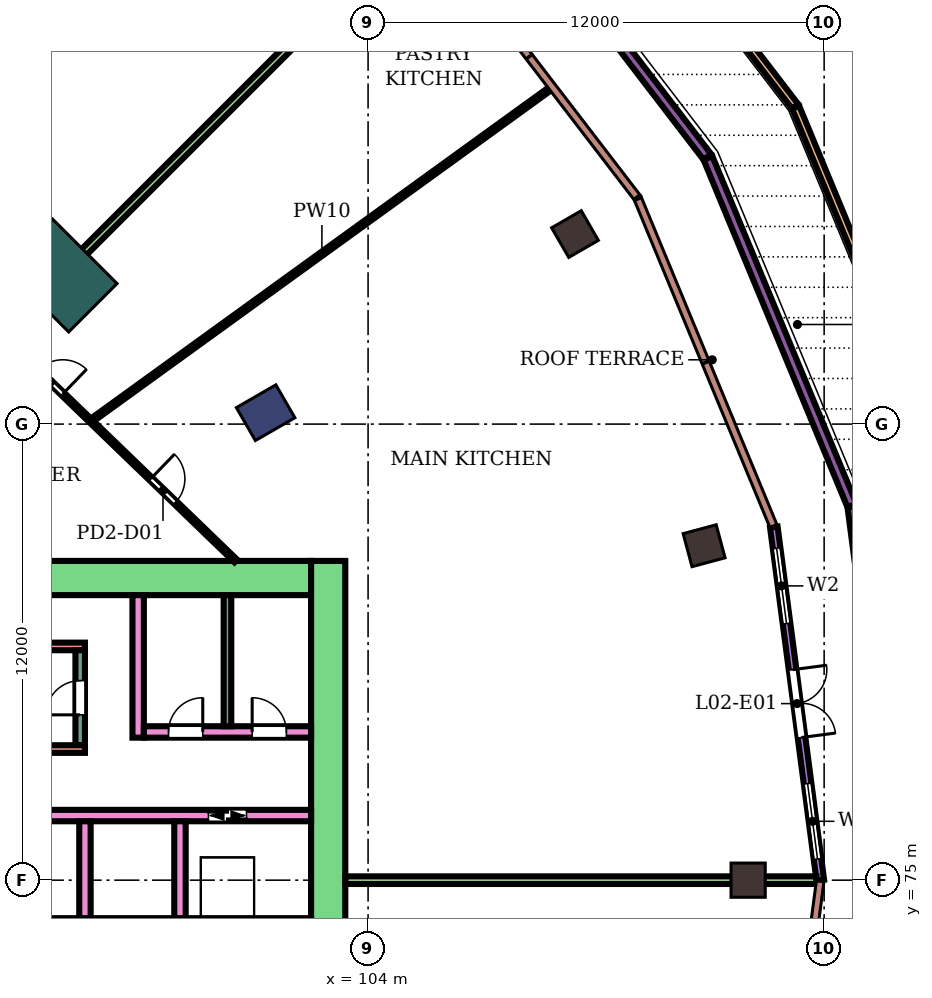
"""IFC4 building model, lengths in metres.
Left out: names, types, materials, properties, quantities, classifications, styles, units other than length and angle.
Written with IfcOpenShell. Run it as: python <this file> out.ifc"""

import sys

from ifc_helpers import new_model, si_unit, direction, frame, frame_2d, origin, origin_2d, place, context, subcontext, project, spatial, rectangle, extrude, element, fill, save


model = new_model("IFC4")
c1 = context("Model", 3, precision=1e-05, world=origin(), true_north=direction((0.0, 1.0)))
c2 = subcontext(c1, "Body", "Model", "MODEL_VIEW")
j1 = project(units=[si_unit("LENGTHUNIT", "METRE"), si_unit("PLANEANGLEUNIT", "RADIAN")], contexts=[c1])
p1 = place(None, origin())
s1 = spatial("IfcSite", under=j1, at=p1, CompositionType="ELEMENT")
p2 = place(p1, origin())
s2 = spatial("IfcBuilding", under=s1, at=p2, CompositionType="ELEMENT")
p3 = place(p2, frame((0.0, 0.0, 12.4)))
s3 = spatial("IfcBuildingStorey", under=s2, at=p3, CompositionType="ELEMENT", Elevation=12.4)
for number, where, z_axis, x_axis in (
    (1, (114.0, 75.0, 0.0), (0.0, 0.0, 1.0), (1.0, 0.0, 0.0)),
    (2, (112.842, 83.8, 0.0), (0.0, 0.0, 1.0), (0.966, 0.259, 0.0)),
    (3, (109.445, 92.0, 0.0), (0.0, 0.0, 1.0), (0.866, 0.5, 0.0)),
):
    element("IfcColumn", number, at=place(p3, frame(where, z_axis=z_axis, x_axis=x_axis)), inside=s3, PredefinedType="COLUMN", context=c2, shape_type="SweptSolid", body=[
        extrude(rectangle(XDim=0.9, YDim=0.9, at=origin_2d()), origin(), (0.0, 0.0, 1.0), 5.4),
    ])
p4 = place(p3, frame((101.304, 87.3, 0.0), z_axis=(0.0, 0.0, 1.0), x_axis=(0.866025403784, 0.5, 0.0)))
e4 = element("IfcColumn", 4, at=p4, inside=s3, PredefinedType="COLUMN", context=c2, shape_type="SweptSolid", body=[
    extrude(rectangle(XDim=1.2, YDim=1.0, at=origin_2d()), origin(), (0.0, 0.0, 1.0), 5.4),
])
p5 = place(p3, frame((95.91, 90.91, 0.0), z_axis=(0.0, 0.0, 1.0), x_axis=(0.707106781187, 0.707106781187, 0.0)))
e5 = element("IfcColumn", 5, at=p5, inside=s3, PredefinedType="COLUMN", context=c2, shape_type="SweptSolid", body=[
    extrude(rectangle(XDim=1.8, YDim=2.4, at=origin_2d()), origin(), (0.0, 0.0, 1.0), 5.4),
])
p6 = place(p3, frame((87.9, 82.95, 0.0), z_axis=(0.0, 0.0, 1.0), x_axis=(1.0, 0.0, 0.0)))
e6 = element("IfcWall", 6, at=p6, inside=s3, PredefinedType="SHEAR", context=c2, shape_type="SweptSolid", body=[
    extrude(rectangle(XDim=14.6, YDim=0.9, at=frame_2d((7.3, 0.0))), origin(), (0.0, 0.0, 1.0), 4.95),
])
p7 = place(p6, frame((4.2, 0.0, 0.0)))
e7 = element("IfcOpeningElement", 7, at=p7, cuts=e6, PredefinedType="OPENING", context=c2, shape_type="SweptSolid", body=[
    extrude(rectangle(XDim=2.4, YDim=2.4, at=frame_2d((1.2, 1.2))), frame((0.0, 0.46, 0.0), z_axis=(0.0, -1.0, 0.0), x_axis=(1.0, 0.0, 0.0)), (0.0, 0.0, 1.0), 0.92),
])
p8 = place(p3, frame((102.95, 66.6, 0.0), z_axis=(0.0, 0.0, 1.0), x_axis=(0.0, 1.0, 0.0)))
e8 = element("IfcWall", 8, at=p8, inside=s3, PredefinedType="SHEAR", context=c2, shape_type="SweptSolid", body=[
    extrude(rectangle(XDim=16.8, YDim=0.9, at=frame_2d((8.4, 0.0))), origin(), (0.0, 0.0, 1.0), 4.95),
])
p9 = place(p3, frame((91.7, 76.7, 0.0), z_axis=(0.0, 0.0, 1.0), x_axis=(1.0, 0.0, 0.0)))
e9 = element("IfcWall", 9, at=p9, inside=s3, PredefinedType="SHEAR", context=c2, shape_type="SweptSolid", body=[
    extrude(rectangle(XDim=10.8, YDim=0.3, at=frame_2d((5.4, 0.0))), origin(), (0.0, 0.0, 1.0), 4.95),
])
p10 = place(p9, frame((0.55, 0.0, 0.0)))
e10 = element("IfcOpeningElement", 10, at=p10, cuts=e9, PredefinedType="OPENING", context=c2, shape_type="SweptSolid", body=[
    extrude(rectangle(XDim=1.1, YDim=2.1, at=frame_2d((0.55, 1.05))), frame((0.0, 0.16, 0.0), z_axis=(0.0, -1.0, 0.0), x_axis=(1.0, 0.0, 0.0)), (0.0, 0.0, 1.0), 0.32),
])
p11 = place(p9, frame((8.1, 0.0, 0.0)))
e11 = element("IfcOpeningElement", 11, at=p11, cuts=e9, PredefinedType="OPENING", context=c2, shape_type="SweptSolid", body=[
    extrude(rectangle(XDim=1.0, YDim=2.1, at=frame_2d((0.5, 1.05))), frame((0.0, 0.16, 0.0), z_axis=(0.0, -1.0, 0.0), x_axis=(1.0, 0.0, 0.0)), (0.0, 0.0, 1.0), 0.32),
])
for number, where, z_axis, x_axis in (
    (12, (96.55, 74.0, 0.0), (0.0, 0.0, 1.0), (0.0, 1.0, 0.0)),
    (13, (99.05, 74.0, 0.0), (0.0, 0.0, 1.0), (0.0, 1.0, 0.0)),
):
    element("IfcWall", number, at=place(p3, frame(where, z_axis=z_axis, x_axis=x_axis)), inside=s3, PredefinedType="SHEAR", context=c2, shape_type="SweptSolid", body=[
        extrude(rectangle(XDim=2.55, YDim=0.3, at=frame_2d((1.275, 0.0))), origin(), (0.0, 0.0, 1.0), 4.95),
    ])
p12 = place(p3, frame((91.7, 81.15, 0.0), z_axis=(0.0, 0.0, 1.0), x_axis=(1.0, 0.0, 0.0)))
e14 = element("IfcWall", 14, at=p12, inside=s3, PredefinedType="SHEAR", context=c2, shape_type="SweptSolid", body=[
    extrude(rectangle(XDim=4.85, YDim=0.2, at=frame_2d((2.425, 0.0))), origin(), (0.0, 0.0, 1.0), 4.95),
])
p13 = place(p3, frame((96.425, 78.55, 0.0), z_axis=(0.0, 0.0, 1.0), x_axis=(0.0, 1.0, 0.0)))
e15 = element("IfcWall", 15, at=p13, inside=s3, PredefinedType="SHEAR", context=c2, shape_type="SweptSolid", body=[
    extrude(rectangle(XDim=2.5, YDim=0.25, at=frame_2d((1.25, 0.0))), origin(), (0.0, 0.0, 1.0), 4.95),
])
p14 = place(p13, frame((0.8, 0.0, 0.0)))
e16 = element("IfcOpeningElement", 16, at=p14, cuts=e15, PredefinedType="OPENING", context=c2, shape_type="SweptSolid", body=[
    extrude(rectangle(XDim=0.9, YDim=2.1, at=frame_2d((0.45, 1.05))), frame((0.0, 0.135, 0.0), z_axis=(0.0, -1.0, 0.0), x_axis=(1.0, 0.0, 0.0)), (0.0, 0.0, 1.0), 0.27),
])
p15 = place(p3, frame((94.3, 78.45, 0.0), z_axis=(0.0, 0.0, 1.0), x_axis=(1.0, 0.0, 0.0)))
e17 = element("IfcWall", 17, at=p15, inside=s3, PredefinedType="SHEAR", context=c2, shape_type="SweptSolid", body=[
    extrude(rectangle(XDim=2.25, YDim=0.2, at=frame_2d((1.125, 0.0))), origin(), (0.0, 0.0, 1.0), 4.95),
])
p16 = place(p3, frame((97.95, 78.75, 0.0), z_axis=(0.0, 0.0, 1.0), x_axis=(0.0, 1.0, 0.0)))
e18 = element("IfcWall", 18, at=p16, inside=s3, PredefinedType="SHEAR", context=c2, shape_type="SweptSolid", body=[
    extrude(rectangle(XDim=3.75, YDim=0.3, at=frame_2d((1.875, 0.0))), origin(), (0.0, 0.0, 1.0), 4.95),
])
p17 = place(p3, frame((98.1, 78.9, 0.0), z_axis=(0.0, 0.0, 1.0), x_axis=(1.0, 0.0, 0.0)))
e19 = element("IfcWall", 19, at=p17, inside=s3, PredefinedType="SHEAR", context=c2, shape_type="SweptSolid", body=[
    extrude(rectangle(XDim=4.4, YDim=0.3, at=frame_2d((2.2, 0.0))), origin(), (0.0, 0.0, 1.0), 4.95),
])
p18 = place(p17, frame((0.65, 0.0, 0.0)))
e20 = element("IfcOpeningElement", 20, at=p18, cuts=e19, PredefinedType="OPENING", context=c2, shape_type="SweptSolid", body=[
    extrude(rectangle(XDim=0.9, YDim=2.1, at=frame_2d((0.45, 1.05))), frame((0.0, 0.16, 0.0), z_axis=(0.0, -1.0, 0.0), x_axis=(1.0, 0.0, 0.0)), (0.0, 0.0, 1.0), 0.32),
])
p19 = place(p17, frame((2.85, 0.0, 0.0)))
e21 = element("IfcOpeningElement", 21, at=p19, cuts=e19, PredefinedType="OPENING", context=c2, shape_type="SweptSolid", body=[
    extrude(rectangle(XDim=0.9, YDim=2.1, at=frame_2d((0.45, 1.05))), frame((0.0, 0.16, 0.0), z_axis=(0.0, -1.0, 0.0), x_axis=(1.0, 0.0, 0.0)), (0.0, 0.0, 1.0), 0.32),
])
p20 = place(p3, frame((115.899, 75.0, 0.0), z_axis=(0.0, 0.0, 1.0), x_axis=(-0.130518532918, 0.99144586971, 0.0)))
e22 = element("IfcWall", 22, at=p20, inside=s3, PredefinedType="NOTDEFINED", context=c2, shape_type="SweptSolid", body=[
    extrude(rectangle(XDim=9.371, YDim=0.2, at=frame_2d((4.686, 0.0))), origin(), (0.0, 0.0, 1.0), 5.4),
])
p21 = place(p20, frame((0.562, 0.0, 0.9)))
e23 = element("IfcOpeningElement", 23, at=p21, cuts=e22, PredefinedType="OPENING", context=c2, shape_type="SweptSolid", body=[
    extrude(rectangle(XDim=2.0, YDim=2.4, at=frame_2d((1.0, 1.2))), frame((0.0, 0.11, 0.0), z_axis=(0.0, -1.0, 0.0), x_axis=(1.0, 0.0, 0.0)), (0.0, 0.0, 1.0), 0.22),
])
p22 = place(p20, frame((3.786, 0.0, 0.0)))
e24 = element("IfcOpeningElement", 24, at=p22, cuts=e22, PredefinedType="OPENING", context=c2, shape_type="SweptSolid", body=[
    extrude(rectangle(XDim=1.8, YDim=2.4, at=frame_2d((0.9, 1.2))), frame((0.0, 0.11, 0.0), z_axis=(0.0, -1.0, 0.0), x_axis=(1.0, 0.0, 0.0)), (0.0, 0.0, 1.0), 0.22),
])
p23 = place(p20, frame((6.81, 0.0, 0.9)))
e25 = element("IfcOpeningElement", 25, at=p23, cuts=e22, PredefinedType="OPENING", context=c2, shape_type="SweptSolid", body=[
    extrude(rectangle(XDim=2.0, YDim=2.4, at=frame_2d((1.0, 1.2))), frame((0.0, 0.11, 0.0), z_axis=(0.0, -1.0, 0.0), x_axis=(1.0, 0.0, 0.0)), (0.0, 0.0, 1.0), 0.22),
])
p24 = place(p3, frame((108.785, 103.767, 0.0), z_axis=(0.0, 0.0, 1.0), x_axis=(0.608761803977, -0.793353052568, 0.0)))
e26 = element("IfcWall", 26, at=p24, inside=s3, PredefinedType="PARAPET", context=c2, shape_type="SweptSolid", body=[
    extrude(rectangle(XDim=10.598, YDim=0.2, at=frame_2d((5.299, 0.0))), origin(), (0.0, 0.0, 1.0), 1.1),
])
p25 = place(p3, frame((115.25, 95.336, 0.0), z_axis=(0.0, 0.0, 1.0), x_axis=(0.382690890544, -0.923876443197, 0.0)))
e27 = element("IfcWall", 27, at=p25, inside=s3, PredefinedType="PARAPET", context=c2, shape_type="SweptSolid", body=[
    extrude(rectangle(XDim=10.598, YDim=0.2, at=frame_2d((5.299, 0.0))), origin(), (0.0, 0.0, 1.0), 1.1),
])
p26 = place(p3, frame((110.28, 97.479, 0.0), z_axis=(0.0, 0.0, 1.0), x_axis=(0.608768650261, -0.793347799177, 0.0)))
e28 = element("IfcWall", 28, at=p26, inside=s3, PredefinedType="USERDEFINED", context=c2, shape_type="SweptSolid", body=[
    extrude(rectangle(XDim=4.348, YDim=0.25, at=frame_2d((2.174, 0.0))), origin(), (0.0, 0.0, 1.0), 0.6),
])
p27 = place(p3, frame((112.943, 94.001, 0.0), z_axis=(0.0, 0.0, 1.0), x_axis=(0.382682268453, -0.923880014619, 0.0)))
e29 = element("IfcWall", 29, at=p27, inside=s3, PredefinedType="USERDEFINED", context=c2, shape_type="SweptSolid", body=[
    extrude(rectangle(XDim=9.896, YDim=0.25, at=frame_2d((4.948, 0.0))), origin(), (0.0, 0.0, 1.0), 0.6),
])
p28 = place(p3, frame((116.739, 84.827, 0.0), z_axis=(0.0, 0.0, 1.0), x_axis=(0.130543713086, -0.991442554551, 0.0)))
e30 = element("IfcWall", 30, at=p28, inside=s3, PredefinedType="USERDEFINED", context=c2, shape_type="SweptSolid", body=[
    extrude(rectangle(XDim=9.912, YDim=0.25, at=frame_2d((4.956, 0.0))), origin(), (0.0, 0.0, 1.0), 0.6),
])
p29 = place(p3, frame((88.602, 89.897, 0.0), z_axis=(0.0, 0.0, 1.0), x_axis=(0.50004595028, 0.865998872752, 0.0)))
e31 = element("IfcWall", 31, at=p29, inside=s3, PredefinedType="PARTITIONING", context=c2, shape_type="SweptSolid", body=[
    extrude(rectangle(XDim=18.596, YDim=0.2, at=frame_2d((9.298, 0.0))), origin(), (0.0, 0.0, 1.0), 3.75),
])
p30 = place(p3, frame((91.876, 86.876, 0.0), z_axis=(0.0, 0.0, 1.0), x_axis=(0.707106781187, 0.707106781187, 0.0)))
e32 = element("IfcWall", 32, at=p30, inside=s3, PredefinedType="PARTITIONING", context=c2, shape_type="SweptSolid", body=[
    extrude(rectangle(XDim=19.004, YDim=0.2, at=frame_2d((9.502, 0.0))), origin(), (0.0, 0.0, 1.0), 3.75),
])
p31 = place(p3, frame((103.402, 75.0, 0.0), z_axis=(0.0, 0.0, 1.0), x_axis=(1.0, 0.0, 0.0)))
e33 = element("IfcWall", 33, at=p31, inside=s3, PredefinedType="PARTITIONING", context=c2, shape_type="SweptSolid", body=[
    extrude(rectangle(XDim=12.394, YDim=0.2, at=frame_2d((6.197, 0.0))), origin(), (0.0, 0.0, 1.0), 3.75),
])
p32 = place(p3, frame((90.536, 93.034, 0.0), z_axis=(0.0, 0.0, 1.0), x_axis=(0.719550314706, -0.694440310327, 0.0)))
e34 = element("IfcWall", 34, at=p32, inside=s3, PredefinedType="PARTITIONING", context=c2, shape_type="SweptSolid", body=[
    extrude(rectangle(XDim=13.875, YDim=0.1, at=frame_2d((6.937, 0.0))), origin(), (0.0, 0.0, 1.0), 4.95),
])
p33 = place(p32, frame((10.763, 0.0, 0.0)))
e35 = element("IfcOpeningElement", 35, at=p33, cuts=e34, PredefinedType="OPENING", context=c2, shape_type="SweptSolid", body=[
    extrude(rectangle(XDim=0.9, YDim=2.1, at=frame_2d((0.45, 1.05))), frame((0.0, 0.06, 0.0), z_axis=(0.0, -1.0, 0.0), x_axis=(1.0, 0.0, 0.0)), (0.0, 0.0, 1.0), 0.12),
])
p34 = place(p32, frame((6.648, 0.0, 0.0)))
e36 = element("IfcOpeningElement", 36, at=p34, cuts=e34, PredefinedType="OPENING", context=c2, shape_type="SweptSolid", body=[
    extrude(rectangle(XDim=0.9, YDim=2.1, at=frame_2d((0.45, 1.05))), frame((0.0, 0.06, 0.0), z_axis=(0.0, -1.0, 0.0), x_axis=(1.0, 0.0, 0.0)), (0.0, 0.0, 1.0), 0.12),
])
p35 = place(p32, frame((2.146, 0.0, 0.0)))
e37 = element("IfcOpeningElement", 37, at=p35, cuts=e34, PredefinedType="OPENING", context=c2, shape_type="SweptSolid", body=[
    extrude(rectangle(XDim=0.9, YDim=2.1, at=frame_2d((0.45, 1.05))), frame((0.0, 0.06, 0.0), z_axis=(0.0, -1.0, 0.0), x_axis=(1.0, 0.0, 0.0)), (0.0, 0.0, 1.0), 0.12),
])
p36 = place(p3, frame((96.752, 87.118, 0.0), z_axis=(0.0, 0.0, 1.0), x_axis=(0.810241473642, 0.586096198921, 0.0)))
e38 = element("IfcWall", 38, at=p36, inside=s3, PredefinedType="PARTITIONING", context=c2, shape_type="SweptSolid", body=[
    extrude(rectangle(XDim=14.891, YDim=0.1, at=frame_2d((7.445, 0.0))), origin(), (0.0, 0.0, 1.0), 4.95),
])
p37 = place(p3, frame((100.3, 79.05, 0.0), z_axis=(0.0, 0.0, 1.0), x_axis=(0.0, 1.0, 0.0)))
e39 = element("IfcWall", 39, at=p37, inside=s3, PredefinedType="PARTITIONING", context=c2, shape_type="SweptSolid", body=[
    extrude(rectangle(XDim=3.45, YDim=0.2, at=frame_2d((1.725, 0.0))), origin(), (0.0, 0.0, 1.0), 4.95),
])
p38 = place(p21, origin())
e40 = element("IfcWindow", 40, at=p38, inside=s3, PartitioningType="SINGLE_PANEL", PredefinedType="WINDOW", context=c2, shape_type="SweptSolid", body=[
    extrude(rectangle(XDim=2.0, YDim=2.4, at=frame_2d((1.0, 1.2))), frame((0.0, 0.03, 0.0), z_axis=(0.0, -1.0, 0.0), x_axis=(1.0, 0.0, 0.0)), (0.0, 0.0, 1.0), 0.06),
])
fill(e23, e40)
p39 = place(p22, frame((1.8, 0.0, 0.0), z_axis=(0.0, 0.0, 1.0), x_axis=(-1.0, 0.0, 0.0)))
e41 = element("IfcDoor", 41, at=p39, inside=s3, OperationType="DOUBLE_DOOR_SINGLE_SWING", PredefinedType="DOOR", context=c2, shape_type="SweptSolid", body=[
    extrude(rectangle(XDim=1.8, YDim=2.4, at=frame_2d((0.9, 1.2))), frame((0.0, 0.025, 0.0), z_axis=(0.0, -1.0, 0.0), x_axis=(1.0, 0.0, 0.0)), (0.0, 0.0, 1.0), 0.05),
])
fill(e24, e41)
p40 = place(p23, origin())
e42 = element("IfcWindow", 42, at=p40, inside=s3, PartitioningType="SINGLE_PANEL", PredefinedType="WINDOW", context=c2, shape_type="SweptSolid", body=[
    extrude(rectangle(XDim=2.0, YDim=2.4, at=frame_2d((1.0, 1.2))), frame((0.0, 0.03, 0.0), z_axis=(0.0, -1.0, 0.0), x_axis=(1.0, 0.0, 0.0)), (0.0, 0.0, 1.0), 0.06),
])
fill(e25, e42)
p41 = place(p33, origin())
e43 = element("IfcDoor", 43, at=p41, inside=s3, OperationType="SINGLE_SWING_LEFT", PredefinedType="DOOR", context=c2, shape_type="SweptSolid", body=[
    extrude(rectangle(XDim=0.9, YDim=2.1, at=frame_2d((0.45, 1.05))), frame((0.0, 0.025, 0.0), z_axis=(0.0, -1.0, 0.0), x_axis=(1.0, 0.0, 0.0)), (0.0, 0.0, 1.0), 0.05),
])
fill(e35, e43)
p42 = place(p34, origin())
e44 = element("IfcDoor", 44, at=p42, inside=s3, OperationType="SINGLE_SWING_RIGHT", PredefinedType="DOOR", context=c2, shape_type="SweptSolid", body=[
    extrude(rectangle(XDim=0.9, YDim=2.1, at=frame_2d((0.45, 1.05))), frame((0.0, 0.025, 0.0), z_axis=(0.0, -1.0, 0.0), x_axis=(1.0, 0.0, 0.0)), (0.0, 0.0, 1.0), 0.05),
])
fill(e36, e44)
p43 = place(p11, origin())
e45 = element("IfcDoor", 45, at=p43, inside=s3, OperationType="DOUBLE_DOOR_SLIDING", PredefinedType="DOOR", context=c2, shape_type="SweptSolid", body=[
    extrude(rectangle(XDim=1.0, YDim=2.1, at=frame_2d((0.5, 1.05))), frame((0.0, 0.025, 0.0), z_axis=(0.0, -1.0, 0.0), x_axis=(1.0, 0.0, 0.0)), (0.0, 0.0, 1.0), 0.05),
])
fill(e11, e45)
p44 = place(p14, origin())
e46 = element("IfcDoor", 46, at=p44, inside=s3, OperationType="SINGLE_SWING_LEFT", PredefinedType="DOOR", context=c2, shape_type="SweptSolid", body=[
    extrude(rectangle(XDim=0.9, YDim=2.1, at=frame_2d((0.45, 1.05))), frame((0.0, 0.025, 0.0), z_axis=(0.0, -1.0, 0.0), x_axis=(1.0, 0.0, 0.0)), (0.0, 0.0, 1.0), 0.05),
])
fill(e16, e46)
p45 = place(p18, origin())
e47 = element("IfcDoor", 47, at=p45, inside=s3, OperationType="SINGLE_SWING_RIGHT", PredefinedType="DOOR", context=c2, shape_type="SweptSolid", body=[
    extrude(rectangle(XDim=0.9, YDim=2.1, at=frame_2d((0.45, 1.05))), frame((0.0, 0.025, 0.0), z_axis=(0.0, -1.0, 0.0), x_axis=(1.0, 0.0, 0.0)), (0.0, 0.0, 1.0), 0.05),
])
fill(e20, e47)
p46 = place(p19, origin())
e48 = element("IfcDoor", 48, at=p46, inside=s3, OperationType="SINGLE_SWING_LEFT", PredefinedType="DOOR", context=c2, shape_type="SweptSolid", body=[
    extrude(rectangle(XDim=0.9, YDim=2.1, at=frame_2d((0.45, 1.05))), frame((0.0, 0.025, 0.0), z_axis=(0.0, -1.0, 0.0), x_axis=(1.0, 0.0, 0.0)), (0.0, 0.0, 1.0), 0.05),
])
fill(e21, e48)
save(model, sys.argv[1])
